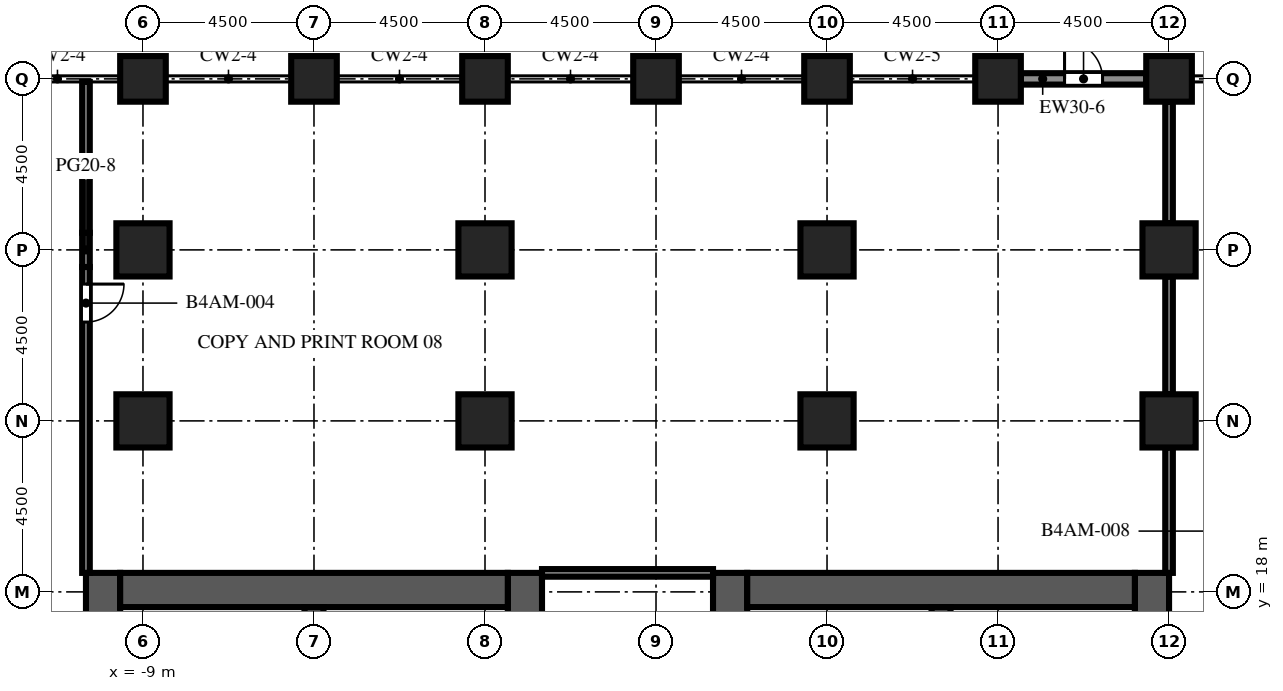
"""IFC4 building model, lengths in metres.
Left out: names, types, materials, properties, quantities, classifications, styles, units other than length and angle.
Written with IfcOpenShell. Run it as: python <this file> out.ifc"""

import sys

from ifc_helpers import new_model, si_unit, direction, frame, frame_2d, origin, origin_2d, place, context, subcontext, project, spatial, rectangle, extrude, element, fill, save


model = new_model("IFC4")
c1 = context("Model", 3, precision=1e-05, world=origin(), true_north=direction((0.0, 1.0)))
c2 = subcontext(c1, "Body", "Model", "MODEL_VIEW")
j1 = project(units=[si_unit("LENGTHUNIT", "METRE"), si_unit("PLANEANGLEUNIT", "RADIAN")], contexts=[c1])
p1 = place(None, origin())
s1 = spatial("IfcSite", under=j1, at=p1, CompositionType="ELEMENT")
p2 = place(p1, origin())
s2 = spatial("IfcBuilding", under=s1, at=p2, CompositionType="ELEMENT")
p3 = place(p2, frame((0.0, 0.0, 145.4)))
s3 = spatial("IfcBuildingStorey", under=s2, at=p3, CompositionType="ELEMENT", Elevation=145.4)
for number, where, z_axis, x_axis in (
    (1, (-9.0, 31.5, 0.0), (0.0, 0.0, 1.0), (1.0, 0.0, 0.0)),
    (2, (-4.5, 31.5, 0.0), (0.0, 0.0, 1.0), (1.0, 0.0, 0.0)),
    (3, (0.0, 31.5, 0.0), (0.0, 0.0, 1.0), (1.0, 0.0, 0.0)),
    (4, (4.5, 31.5, 0.0), (0.0, 0.0, 1.0), (1.0, 0.0, 0.0)),
    (5, (9.0, 31.5, 0.0), (0.0, 0.0, 1.0), (1.0, 0.0, 0.0)),
    (6, (13.5, 31.5, 0.0), (0.0, 0.0, 1.0), (1.0, 0.0, 0.0)),
    (7, (18.0, 31.5, 0.0), (0.0, 0.0, 1.0), (1.0, 0.0, 0.0)),
):
    element("IfcColumn", number, at=place(p3, frame(where, z_axis=z_axis, x_axis=x_axis)), inside=s3, PredefinedType="COLUMN", context=c2, shape_type="SweptSolid", body=[
        extrude(rectangle(XDim=1.2, YDim=1.2, at=origin_2d()), origin(), (0.0, 0.0, 1.0), 6.0),
    ])
p4 = place(p3, frame((-9.0, 22.5, 0.0), z_axis=(0.0, 0.0, 1.0), x_axis=(1.0, 0.0, 0.0)))
e8 = element("IfcColumn", 8, at=p4, inside=s3, PredefinedType="COLUMN", context=c2, shape_type="SweptSolid", body=[
    extrude(rectangle(XDim=1.4, YDim=1.4, at=origin_2d()), origin(), (0.0, 0.0, 1.0), 6.0),
])
p5 = place(p3, frame((-9.0, 27.0, 0.0), z_axis=(0.0, 0.0, 1.0), x_axis=(1.0, 0.0, 0.0)))
e9 = element("IfcColumn", 9, at=p5, inside=s3, PredefinedType="COLUMN", context=c2, shape_type="SweptSolid", body=[
    extrude(rectangle(XDim=1.4, YDim=1.4, at=origin_2d()), origin(), (0.0, 0.0, 1.0), 5.4),
])
p6 = place(p3, frame((0.0, 22.5, 0.0), z_axis=(0.0, 0.0, 1.0), x_axis=(1.0, 0.0, 0.0)))
e10 = element("IfcColumn", 10, at=p6, inside=s3, PredefinedType="COLUMN", context=c2, shape_type="SweptSolid", body=[
    extrude(rectangle(XDim=1.4, YDim=1.4, at=origin_2d()), origin(), (0.0, 0.0, 1.0), 6.0),
])
p7 = place(p3, frame((0.0, 27.0, 0.0), z_axis=(0.0, 0.0, 1.0), x_axis=(1.0, 0.0, 0.0)))
e11 = element("IfcColumn", 11, at=p7, inside=s3, PredefinedType="COLUMN", context=c2, shape_type="SweptSolid", body=[
    extrude(rectangle(XDim=1.4, YDim=1.4, at=origin_2d()), origin(), (0.0, 0.0, 1.0), 5.4),
])
p8 = place(p3, frame((9.0, 22.5, 0.0), z_axis=(0.0, 0.0, 1.0), x_axis=(1.0, 0.0, 0.0)))
e12 = element("IfcColumn", 12, at=p8, inside=s3, PredefinedType="COLUMN", context=c2, shape_type="SweptSolid", body=[
    extrude(rectangle(XDim=1.4, YDim=1.4, at=origin_2d()), origin(), (0.0, 0.0, 1.0), 6.0),
])
p9 = place(p3, frame((9.0, 27.0, 0.0), z_axis=(0.0, 0.0, 1.0), x_axis=(1.0, 0.0, 0.0)))
e13 = element("IfcColumn", 13, at=p9, inside=s3, PredefinedType="COLUMN", context=c2, shape_type="SweptSolid", body=[
    extrude(rectangle(XDim=1.4, YDim=1.4, at=origin_2d()), origin(), (0.0, 0.0, 1.0), 5.4),
])
p10 = place(p3, frame((18.0, 22.5, 0.0), z_axis=(0.0, 0.0, 1.0), x_axis=(1.0, 0.0, 0.0)))
e14 = element("IfcColumn", 14, at=p10, inside=s3, PredefinedType="COLUMN", context=c2, shape_type="SweptSolid", body=[
    extrude(rectangle(XDim=1.4, YDim=1.4, at=origin_2d()), origin(), (0.0, 0.0, 1.0), 6.0),
])
p11 = place(p3, frame((18.0, 27.0, 0.0), z_axis=(0.0, 0.0, 1.0), x_axis=(1.0, 0.0, 0.0)))
e15 = element("IfcColumn", 15, at=p11, inside=s3, PredefinedType="COLUMN", context=c2, shape_type="SweptSolid", body=[
    extrude(rectangle(XDim=1.4, YDim=1.4, at=origin_2d()), origin(), (0.0, 0.0, 1.0), 5.4),
])
p12 = place(p3, frame((-10.05, -9.0, 0.0), z_axis=(0.0, 0.0, 1.0), x_axis=(0.0, 1.0, 0.0)))
e16 = element("IfcWall", 16, at=p12, inside=s3, PredefinedType="SHEAR", context=c2, shape_type="SweptSolid", body=[
    extrude(rectangle(XDim=27.5, YDim=0.9, at=frame_2d((13.75, 0.0))), origin(), (0.0, 0.0, 1.0), 6.0),
])
p13 = place(p12, frame((12.55, 0.0, 0.0)))
e17 = element("IfcOpeningElement", 17, at=p13, cuts=e16, PredefinedType="OPENING", context=c2, shape_type="SweptSolid", body=[
    extrude(rectangle(XDim=2.4, YDim=2.4, at=frame_2d((1.2, 1.2))), frame((0.0, 0.46, 0.0), z_axis=(0.0, -1.0, 0.0), x_axis=(1.0, 0.0, 0.0)), (0.0, 0.0, 1.0), 0.92),
])
p14 = place(p12, frame((6.825, 0.0, 0.0)))
e18 = element("IfcOpeningElement", 18, at=p14, cuts=e16, PredefinedType="OPENING", context=c2, shape_type="SweptSolid", body=[
    extrude(rectangle(XDim=1.2, YDim=2.1, at=frame_2d((0.6, 1.05))), frame((0.0, 0.46, 0.0), z_axis=(0.0, -1.0, 0.0), x_axis=(1.0, 0.0, 0.0)), (0.0, 0.0, 1.0), 0.92),
])
p15 = place(p12, frame((19.475, 0.0, 0.0)))
e19 = element("IfcOpeningElement", 19, at=p15, cuts=e16, PredefinedType="OPENING", context=c2, shape_type="SweptSolid", body=[
    extrude(rectangle(XDim=1.2, YDim=2.1, at=frame_2d((0.6, 1.05))), frame((0.0, 0.46, 0.0), z_axis=(0.0, -1.0, 0.0), x_axis=(1.0, 0.0, 0.0)), (0.0, 0.0, 1.0), 0.92),
])
p16 = place(p3, frame((1.05, -9.0, 0.0), z_axis=(0.0, 0.0, 1.0), x_axis=(0.0, 1.0, 0.0)))
e20 = element("IfcWall", 20, at=p16, inside=s3, PredefinedType="SHEAR", context=c2, shape_type="SweptSolid", body=[
    extrude(rectangle(XDim=27.5, YDim=0.9, at=frame_2d((13.75, 0.0))), origin(), (0.0, 0.0, 1.0), 6.0),
])
p17 = place(p16, frame((12.55, 0.0, 0.0)))
e21 = element("IfcOpeningElement", 21, at=p17, cuts=e20, PredefinedType="OPENING", context=c2, shape_type="SweptSolid", body=[
    extrude(rectangle(XDim=2.4, YDim=2.4, at=frame_2d((1.2, 1.2))), frame((0.0, 0.46, 0.0), z_axis=(0.0, -1.0, 0.0), x_axis=(1.0, 0.0, 0.0)), (0.0, 0.0, 1.0), 0.92),
])
p18 = place(p16, frame((5.51, 0.0, 0.0)))
e22 = element("IfcOpeningElement", 22, at=p18, cuts=e20, PredefinedType="OPENING", context=c2, shape_type="SweptSolid", body=[
    extrude(rectangle(XDim=0.923, YDim=2.1, at=frame_2d((0.461, 1.05))), frame((0.0, 0.46, 0.0), z_axis=(0.0, -1.0, 0.0), x_axis=(1.0, 0.0, 0.0)), (0.0, 0.0, 1.0), 0.92),
])
p19 = place(p16, frame((23.427, 0.0, 0.0)))
e23 = element("IfcOpeningElement", 23, at=p19, cuts=e20, PredefinedType="OPENING", context=c2, shape_type="SweptSolid", body=[
    extrude(rectangle(XDim=1.2, YDim=2.1, at=frame_2d((0.6, 1.05))), frame((0.0, 0.46, 0.0), z_axis=(0.0, -1.0, 0.0), x_axis=(1.0, 0.0, 0.0)), (0.0, 0.0, 1.0), 0.92),
])
p20 = place(p3, frame((-9.6, 18.05, 0.0), z_axis=(0.0, 0.0, 1.0), x_axis=(1.0, 0.0, 0.0)))
e24 = element("IfcWall", 24, at=p20, inside=s3, PredefinedType="SHEAR", context=c2, shape_type="SweptSolid", body=[
    extrude(rectangle(XDim=10.2, YDim=0.9, at=frame_2d((5.1, 0.0))), origin(), (0.0, 0.0, 1.0), 6.0),
])
p21 = place(p3, frame((-4.5, 10.25, 0.0), z_axis=(0.0, 0.0, 1.0), x_axis=(0.0, 1.0, 0.0)))
e25 = element("IfcWall", 25, at=p21, inside=s3, PredefinedType="SHEAR", context=c2, shape_type="SweptSolid", body=[
    extrude(rectangle(XDim=7.35, YDim=0.5, at=frame_2d((3.675, 0.0))), origin(), (0.0, 0.0, 1.0), 6.0),
])
p22 = place(p3, frame((6.45, -9.0, 0.0), z_axis=(0.0, 0.0, 1.0), x_axis=(0.0, 1.0, 0.0)))
e26 = element("IfcWall", 26, at=p22, inside=s3, PredefinedType="SHEAR", context=c2, shape_type="SweptSolid", body=[
    extrude(rectangle(XDim=27.5, YDim=0.9, at=frame_2d((13.75, 0.0))), origin(), (0.0, 0.0, 1.0), 6.0),
])
p23 = place(p22, frame((12.55, 0.0, 0.0)))
e27 = element("IfcOpeningElement", 27, at=p23, cuts=e26, PredefinedType="OPENING", context=c2, shape_type="SweptSolid", body=[
    extrude(rectangle(XDim=2.4, YDim=2.4, at=frame_2d((1.2, 1.2))), frame((0.0, 0.46, 0.0), z_axis=(0.0, -1.0, 0.0), x_axis=(1.0, 0.0, 0.0)), (0.0, 0.0, 1.0), 0.92),
])
p24 = place(p22, frame((5.51, 0.0, 0.0)))
e28 = element("IfcOpeningElement", 28, at=p24, cuts=e26, PredefinedType="OPENING", context=c2, shape_type="SweptSolid", body=[
    extrude(rectangle(XDim=0.923, YDim=2.1, at=frame_2d((0.461, 1.05))), frame((0.0, 0.46, 0.0), z_axis=(0.0, -1.0, 0.0), x_axis=(1.0, 0.0, 0.0)), (0.0, 0.0, 1.0), 0.92),
])
p25 = place(p22, frame((23.427, 0.0, 0.0)))
e29 = element("IfcOpeningElement", 29, at=p25, cuts=e26, PredefinedType="OPENING", context=c2, shape_type="SweptSolid", body=[
    extrude(rectangle(XDim=1.2, YDim=2.1, at=frame_2d((0.6, 1.05))), frame((0.0, 0.46, 0.0), z_axis=(0.0, -1.0, 0.0), x_axis=(1.0, 0.0, 0.0)), (0.0, 0.0, 1.0), 0.92),
])
p26 = place(p3, frame((17.55, -9.0, 0.0), z_axis=(0.0, 0.0, 1.0), x_axis=(0.0, 1.0, 0.0)))
e30 = element("IfcWall", 30, at=p26, inside=s3, PredefinedType="SHEAR", context=c2, shape_type="SweptSolid", body=[
    extrude(rectangle(XDim=27.5, YDim=0.9, at=frame_2d((13.75, 0.0))), origin(), (0.0, 0.0, 1.0), 6.0),
])
p27 = place(p26, frame((12.55, 0.0, 0.0)))
e31 = element("IfcOpeningElement", 31, at=p27, cuts=e30, PredefinedType="OPENING", context=c2, shape_type="SweptSolid", body=[
    extrude(rectangle(XDim=2.4, YDim=2.4, at=frame_2d((1.2, 1.2))), frame((0.0, 0.46, 0.0), z_axis=(0.0, -1.0, 0.0), x_axis=(1.0, 0.0, 0.0)), (0.0, 0.0, 1.0), 0.92),
])
p28 = place(p26, frame((6.825, 0.0, 0.0)))
e32 = element("IfcOpeningElement", 32, at=p28, cuts=e30, PredefinedType="OPENING", context=c2, shape_type="SweptSolid", body=[
    extrude(rectangle(XDim=1.2, YDim=2.1, at=frame_2d((0.6, 1.05))), frame((0.0, 0.46, 0.0), z_axis=(0.0, -1.0, 0.0), x_axis=(1.0, 0.0, 0.0)), (0.0, 0.0, 1.0), 0.92),
])
p29 = place(p26, frame((19.475, 0.0, 0.0)))
e33 = element("IfcOpeningElement", 33, at=p29, cuts=e30, PredefinedType="OPENING", context=c2, shape_type="SweptSolid", body=[
    extrude(rectangle(XDim=1.2, YDim=2.1, at=frame_2d((0.6, 1.05))), frame((0.0, 0.46, 0.0), z_axis=(0.0, -1.0, 0.0), x_axis=(1.0, 0.0, 0.0)), (0.0, 0.0, 1.0), 0.92),
])
p30 = place(p3, frame((6.9, 18.05, 0.0), z_axis=(0.0, 0.0, 1.0), x_axis=(1.0, 0.0, 0.0)))
e34 = element("IfcWall", 34, at=p30, inside=s3, PredefinedType="SHEAR", context=c2, shape_type="SweptSolid", body=[
    extrude(rectangle(XDim=10.2, YDim=0.9, at=frame_2d((5.1, 0.0))), origin(), (0.0, 0.0, 1.0), 6.0),
])
p31 = place(p3, frame((12.0, 10.25, 0.0), z_axis=(0.0, 0.0, 1.0), x_axis=(0.0, 1.0, 0.0)))
e35 = element("IfcWall", 35, at=p31, inside=s3, PredefinedType="SHEAR", context=c2, shape_type="SweptSolid", body=[
    extrude(rectangle(XDim=7.35, YDim=0.5, at=frame_2d((3.675, 0.0))), origin(), (0.0, 0.0, 1.0), 6.0),
])
p32 = place(p3, frame((14.1, 31.5, 0.0), z_axis=(0.0, 0.0, 1.0), x_axis=(1.0, 0.0, 0.0)))
e36 = element("IfcWall", 36, at=p32, inside=s3, PredefinedType="SOLIDWALL", context=c2, shape_type="SweptSolid", body=[
    extrude(rectangle(XDim=3.3, YDim=0.3, at=frame_2d((1.65, 0.0))), origin(), (0.0, 0.0, 1.0), 4.5),
])
p33 = place(p32, frame((1.15, 0.0, 0.0)))
e37 = element("IfcOpeningElement", 37, at=p33, cuts=e36, PredefinedType="OPENING", context=c2, shape_type="SweptSolid", body=[
    extrude(rectangle(XDim=1.0, YDim=2.2, at=frame_2d((0.5, 1.1))), frame((0.0, 0.16, 0.0), z_axis=(0.0, -1.0, 0.0), x_axis=(1.0, 0.0, 0.0)), (0.0, 0.0, 1.0), 0.32),
])
p34 = place(p3, frame((-0.7, 15.028, 0.0), z_axis=(0.0, 0.0, 1.0), x_axis=(0.0, 1.0, 0.0)))
e38 = element("IfcWall", 38, at=p34, inside=s3, PredefinedType="PARTITIONING", context=c2, shape_type="SweptSolid", body=[
    extrude(rectangle(XDim=2.573, YDim=0.1, at=frame_2d((1.286, 0.0))), origin(), (0.0, 0.0, 1.0), 5.4),
])
p35 = place(p34, frame((0.786, 0.0, 0.0)))
e39 = element("IfcOpeningElement", 39, at=p35, cuts=e38, PredefinedType="OPENING", context=c2, shape_type="SweptSolid", body=[
    extrude(rectangle(XDim=1.0, YDim=2.1, at=frame_2d((0.5, 1.05))), frame((0.0, 0.06, 0.0), z_axis=(0.0, -1.0, 0.0), x_axis=(1.0, 0.0, 0.0)), (0.0, 0.0, 1.0), 0.12),
])
p36 = place(p3, frame((8.2, 15.028, 0.0), z_axis=(0.0, 0.0, 1.0), x_axis=(0.0, 1.0, 0.0)))
e40 = element("IfcWall", 40, at=p36, inside=s3, PredefinedType="PARTITIONING", context=c2, shape_type="SweptSolid", body=[
    extrude(rectangle(XDim=2.573, YDim=0.1, at=frame_2d((1.286, 0.0))), origin(), (0.0, 0.0, 1.0), 5.4),
])
p37 = place(p36, frame((0.786, 0.0, 0.0)))
e41 = element("IfcOpeningElement", 41, at=p37, cuts=e40, PredefinedType="OPENING", context=c2, shape_type="SweptSolid", body=[
    extrude(rectangle(XDim=1.0, YDim=2.1, at=frame_2d((0.5, 1.05))), frame((0.0, 0.06, 0.0), z_axis=(0.0, -1.0, 0.0), x_axis=(1.0, 0.0, 0.0)), (0.0, 0.0, 1.0), 0.12),
])
p38 = place(p3, frame((-10.5, 26.55, 0.0), z_axis=(0.0, 0.0, 1.0), x_axis=(0.0, -1.0, 0.0)))
e42 = element("IfcWall", 42, at=p38, inside=s3, PredefinedType="PARTITIONING", context=c2, shape_type="SweptSolid", body=[
    extrude(rectangle(XDim=8.05, YDim=0.2, at=frame_2d((4.025, 0.0))), origin(), (0.0, 0.0, 1.0), 5.4),
])
p39 = place(p38, frame((0.45, 0.0, 0.0)))
e43 = element("IfcOpeningElement", 43, at=p39, cuts=e42, PredefinedType="OPENING", context=c2, shape_type="SweptSolid", body=[
    extrude(rectangle(XDim=1.0, YDim=2.1, at=frame_2d((0.5, 1.05))), frame((0.0, 0.11, 0.0), z_axis=(0.0, -1.0, 0.0), x_axis=(1.0, 0.0, 0.0)), (0.0, 0.0, 1.0), 0.22),
])
p40 = place(p3, frame((-10.5, 26.55, 0.0), z_axis=(0.0, 0.0, 1.0), x_axis=(0.0, 1.0, 0.0)))
e44 = element("IfcWall", 44, at=p40, inside=s3, PredefinedType="PARTITIONING", context=c2, shape_type="SweptSolid", body=[
    extrude(rectangle(XDim=0.9, YDim=0.2, at=frame_2d((0.45, 0.0))), origin(), (0.0, 0.0, 1.0), 3.57),
])
p41 = place(p3, frame((-10.5, 27.45, 0.0), z_axis=(0.0, 0.0, 1.0), x_axis=(0.0, 1.0, 0.0)))
e45 = element("IfcWall", 45, at=p41, inside=s3, PredefinedType="PARTITIONING", context=c2, shape_type="SweptSolid", body=[
    extrude(rectangle(XDim=3.97, YDim=0.2, at=frame_2d((1.985, 0.0))), origin(), (0.0, 0.0, 1.0), 5.4),
])
p42 = place(p3, frame((18.0, 18.5, 0.0), z_axis=(0.0, 0.0, 1.0), x_axis=(0.0, 1.0, 0.0)))
e46 = element("IfcWall", 46, at=p42, inside=s3, PredefinedType="PARTITIONING", context=c2, shape_type="SweptSolid", body=[
    extrude(rectangle(XDim=3.3, YDim=0.2, at=frame_2d((1.65, 0.0))), origin(), (0.0, 0.0, 1.0), 5.4),
])
p43 = place(p3, frame((18.0, 23.2, 0.0), z_axis=(0.0, 0.0, 1.0), x_axis=(0.0, 1.0, 0.0)))
e47 = element("IfcWall", 47, at=p43, inside=s3, PredefinedType="PARTITIONING", context=c2, shape_type="SweptSolid", body=[
    extrude(rectangle(XDim=3.1, YDim=0.2, at=frame_2d((1.55, 0.0))), origin(), (0.0, 0.0, 1.0), 5.4),
])
p44 = place(p3, frame((18.0, 27.7, 0.0), z_axis=(0.0, 0.0, 1.0), x_axis=(0.0, 1.0, 0.0)))
e48 = element("IfcWall", 48, at=p44, inside=s3, PredefinedType="PARTITIONING", context=c2, shape_type="SweptSolid", body=[
    extrude(rectangle(XDim=3.2, YDim=0.2, at=frame_2d((1.6, 0.0))), origin(), (0.0, 0.0, 1.0), 5.4),
])
p45 = place(p3, frame((1.5, 18.5, 0.0), z_axis=(0.0, 0.0, 1.0), x_axis=(1.0, 0.0, 0.0)))
e49 = element("IfcWall", 49, at=p45, inside=s3, PredefinedType="PARTITIONING", context=c2, shape_type="SweptSolid", body=[
    extrude(rectangle(XDim=4.5, YDim=0.2, at=frame_2d((2.25, 0.0))), origin(), (0.0, 0.0, 1.0), 5.4),
])
p46 = place(p33, origin())
e50 = element("IfcDoor", 50, at=p46, inside=s3, OperationType="SINGLE_SWING_LEFT", PredefinedType="DOOR", context=c2, shape_type="SweptSolid", body=[
    extrude(rectangle(XDim=1.0, YDim=2.2, at=frame_2d((0.5, 1.1))), frame((0.0, 0.025, 0.0), z_axis=(0.0, -1.0, 0.0), x_axis=(1.0, 0.0, 0.0)), (0.0, 0.0, 1.0), 0.05),
])
fill(e37, e50)
p47 = place(p39, origin())
e51 = element("IfcDoor", 51, at=p47, inside=s3, OperationType="SINGLE_SWING_LEFT", PredefinedType="DOOR", context=c2, shape_type="SweptSolid", body=[
    extrude(rectangle(XDim=1.0, YDim=2.1, at=frame_2d((0.5, 1.05))), frame((0.0, 0.025, 0.0), z_axis=(0.0, -1.0, 0.0), x_axis=(1.0, 0.0, 0.0)), (0.0, 0.0, 1.0), 0.05),
])
fill(e43, e51)
save(model, sys.argv[1])
